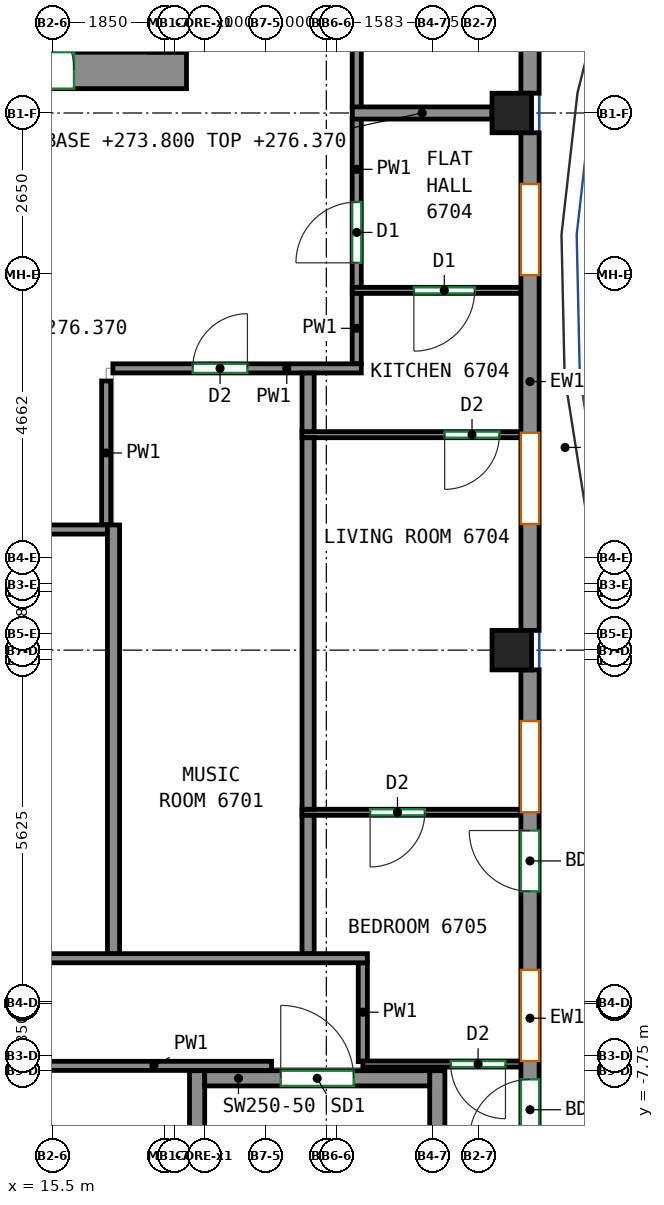
"""IFC4 building model, lengths in metres.
Left out: names, types, materials, properties, quantities, classifications, styles, units other than length and angle.
Written with IfcOpenShell. Run it as: python <this file> out.ifc"""

import sys

from ifc_helpers import new_model, si_unit, direction, frame, frame_2d, origin, origin_2d, place, context, subcontext, project, spatial, rectangle, extrude, source, transform, mapped, element, fill, save


model = new_model("IFC4")
c1 = context("Model", 3, precision=1e-05, world=origin(), true_north=direction((0.0, 1.0)))
c2 = subcontext(c1, "Body", "Model", "MODEL_VIEW")
j1 = project(units=[si_unit("LENGTHUNIT", "METRE"), si_unit("PLANEANGLEUNIT", "RADIAN")], contexts=[c1])
p1 = place(None, origin())
s1 = spatial("IfcSite", under=j1, at=p1, CompositionType="ELEMENT")
p2 = place(p1, origin())
s2 = spatial("IfcBuilding", under=s1, at=p2, CompositionType="ELEMENT")
p3 = place(p2, frame((0.0, 0.0, 273.8)))
s3 = spatial("IfcBuildingStorey", under=s2, at=p3, CompositionType="ELEMENT", Elevation=273.8)
m1 = source(origin(), c2, "Body", "SweptSolid", [
    extrude(rectangle(XDim=0.65, YDim=0.65, at=origin_2d()), origin(), (0.0, 0.0, 1.0), 3.12),
])
for number, where, z_axis, x_axis in (
    (1, (23.05, -0.833, 0.0), (0.0, 0.0, 1.0), (1.0, 0.0, 0.0)),
    (2, (23.05, 8.0, 0.0), (0.0, 0.0, 1.0), (1.0, 0.0, 0.0)),
):
    element("IfcColumn", number, at=place(p3, frame(where, z_axis=z_axis, x_axis=x_axis)), inside=s3, PredefinedType="COLUMN", context=c2, shape_type="MappedRepresentation", body=[
        mapped(m1, transform((0.0, 0.0, 0.0))),
    ])
m2 = source(origin(), c2, "Body", "SweptSolid", [
    extrude(rectangle(XDim=5.23, YDim=0.6, at=frame_2d((2.615, 0.0))), origin(), (0.0, 0.0, 1.0), 3.12),
])
p4 = place(p3, frame((12.47, 8.7, 0.0), z_axis=(0.0, 0.0, 1.0), x_axis=(1.0, 0.0, 0.0)))
e3 = element("IfcWall", 3, at=p4, inside=s3, PredefinedType="SHEAR", context=c2, shape_type="MappedRepresentation", body=[
    mapped(m2, transform((0.0, 0.0, 0.0))),
])
p5 = place(p4, frame((2.18, 0.0, 0.0)))
e4 = element("IfcOpeningElement", 4, at=p5, cuts=e3, PredefinedType="OPENING", context=c2, shape_type="SweptSolid", body=[
    extrude(rectangle(XDim=1.2, YDim=2.1, at=frame_2d((0.6, 1.05))), frame((0.0, 0.31, 0.0), z_axis=(0.0, -1.0, 0.0), x_axis=(1.0, 0.0, 0.0)), (0.0, 0.0, 1.0), 0.62),
])
m3 = source(origin(), c2, "Body", "SweptSolid", [
    extrude(rectangle(XDim=8.0, YDim=0.25, at=frame_2d((4.0, 0.0))), origin(), (0.0, 0.0, 1.0), 3.12),
])
for number, where, z_axis, x_axis in (
    (5, (17.875, -15.75, 0.0), (0.0, 0.0, 1.0), (0.0, 1.0, 0.0)),
    (6, (21.825, -15.75, 0.0), (0.0, 0.0, 1.0), (0.0, 1.0, 0.0)),
):
    element("IfcWall", number, at=place(p3, frame(where, z_axis=z_axis, x_axis=x_axis)), inside=s3, PredefinedType="SHEAR", context=c2, shape_type="MappedRepresentation", body=[
        mapped(m3, transform((0.0, 0.0, 0.0))),
    ])
m4 = source(origin(), c2, "Body", "SweptSolid", [
    extrude(rectangle(XDim=3.7, YDim=0.25, at=frame_2d((1.85, 0.0))), origin(), (0.0, 0.0, 1.0), 3.12),
])
p6 = place(p3, frame((18.0, -7.875, 0.0), z_axis=(0.0, 0.0, 1.0), x_axis=(1.0, 0.0, 0.0)))
e7 = element("IfcWall", 7, at=p6, inside=s3, PredefinedType="SHEAR", context=c2, shape_type="MappedRepresentation", body=[
    mapped(m4, transform((0.0, 0.0, 0.0))),
])
p7 = place(p6, frame((1.25, 0.0, 0.0)))
e8 = element("IfcOpeningElement", 8, at=p7, cuts=e7, PredefinedType="OPENING", context=c2, shape_type="SweptSolid", body=[
    extrude(rectangle(XDim=1.2, YDim=2.1, at=frame_2d((0.6, 1.05))), frame((0.0, 0.135, 0.0), z_axis=(0.0, -1.0, 0.0), x_axis=(1.0, 0.0, 0.0)), (0.0, 0.0, 1.0), 0.27),
])
m5 = source(origin(), c2, "Body", "SweptSolid", [
    extrude(rectangle(XDim=8.184, YDim=0.3, at=frame_2d((4.092, 0.0))), origin(), (0.0, 0.0, 1.0), 3.12),
])
p8 = place(p3, frame((23.35, -9.342, 0.0), z_axis=(0.0, 0.0, 1.0), x_axis=(0.0, 1.0, 0.0)))
e9 = element("IfcWall", 9, at=p8, inside=s3, PredefinedType="SOLIDWALL", context=c2, shape_type="MappedRepresentation", body=[
    mapped(m5, transform((0.0, 0.0, 0.0))),
])
p9 = place(p8, frame((1.75, 0.0, 0.8)))
e10 = element("IfcOpeningElement", 10, at=p9, cuts=e9, PredefinedType="OPENING", context=c2, shape_type="SweptSolid", body=[
    extrude(rectangle(XDim=1.5, YDim=2.05, at=frame_2d((0.75, 1.025))), frame((0.0, 0.16, 0.0), z_axis=(0.0, -1.0, 0.0), x_axis=(1.0, 0.0, 0.0)), (0.0, 0.0, 1.0), 0.32),
])
p10 = place(p8, frame((0.45, 0.0, 0.0)))
e11 = element("IfcOpeningElement", 11, at=p10, cuts=e9, PredefinedType="OPENING", context=c2, shape_type="SweptSolid", body=[
    extrude(rectangle(XDim=1.0, YDim=2.1, at=frame_2d((0.5, 1.05))), frame((0.0, 0.16, 0.0), z_axis=(0.0, -1.0, 0.0), x_axis=(1.0, 0.0, 0.0)), (0.0, 0.0, 1.0), 0.32),
])
p11 = place(p8, frame((5.842, 0.0, 0.8)))
e12 = element("IfcOpeningElement", 12, at=p11, cuts=e9, PredefinedType="OPENING", context=c2, shape_type="SweptSolid", body=[
    extrude(rectangle(XDim=1.5, YDim=2.05, at=frame_2d((0.75, 1.025))), frame((0.0, 0.16, 0.0), z_axis=(0.0, -1.0, 0.0), x_axis=(1.0, 0.0, 0.0)), (0.0, 0.0, 1.0), 0.32),
])
p12 = place(p8, frame((4.542, 0.0, 0.0)))
e13 = element("IfcOpeningElement", 13, at=p12, cuts=e9, PredefinedType="OPENING", context=c2, shape_type="SweptSolid", body=[
    extrude(rectangle(XDim=1.0, YDim=2.1, at=frame_2d((0.5, 1.05))), frame((0.0, 0.16, 0.0), z_axis=(0.0, -1.0, 0.0), x_axis=(1.0, 0.0, 0.0)), (0.0, 0.0, 1.0), 0.32),
])
m6 = source(origin(), c2, "Body", "SweptSolid", [
    extrude(rectangle(XDim=8.183, YDim=0.3, at=frame_2d((4.092, 0.0))), origin(), (0.0, 0.0, 1.0), 3.12),
])
p13 = place(p3, frame((23.35, -0.508, 0.0), z_axis=(0.0, 0.0, 1.0), x_axis=(0.0, 1.0, 0.0)))
e14 = element("IfcWall", 14, at=p13, inside=s3, PredefinedType="SOLIDWALL", context=c2, shape_type="MappedRepresentation", body=[
    mapped(m6, transform((0.0, 0.0, 0.0))),
])
p14 = place(p13, frame((1.75, 0.0, 0.8)))
e15 = element("IfcOpeningElement", 15, at=p14, cuts=e14, PredefinedType="OPENING", context=c2, shape_type="SweptSolid", body=[
    extrude(rectangle(XDim=1.5, YDim=2.05, at=frame_2d((0.75, 1.025))), frame((0.0, 0.16, 0.0), z_axis=(0.0, -1.0, 0.0), x_axis=(1.0, 0.0, 0.0)), (0.0, 0.0, 1.0), 0.32),
])
p15 = place(p13, frame((5.842, 0.0, 0.8)))
e16 = element("IfcOpeningElement", 16, at=p15, cuts=e14, PredefinedType="OPENING", context=c2, shape_type="SweptSolid", body=[
    extrude(rectangle(XDim=1.5, YDim=2.05, at=frame_2d((0.75, 1.025))), frame((0.0, 0.16, 0.0), z_axis=(0.0, -1.0, 0.0), x_axis=(1.0, 0.0, 0.0)), (0.0, 0.0, 1.0), 0.32),
])
m7 = source(origin(), c2, "Body", "SweptSolid", [
    extrude(rectangle(XDim=13.35, YDim=0.3, at=frame_2d((6.675, 0.0))), origin(), (0.0, 0.0, 1.0), 3.12),
])
p16 = place(p3, frame((23.35, 8.325, 0.0), z_axis=(0.0, 0.0, 1.0), x_axis=(0.0, 1.0, 0.0)))
e17 = element("IfcWall", 17, at=p16, inside=s3, PredefinedType="SOLIDWALL", context=c2, shape_type="MappedRepresentation", body=[
    mapped(m7, transform((0.0, 0.0, 0.0))),
])
p17 = place(p16, frame((0.919, 0.0, 0.8)))
e18 = element("IfcOpeningElement", 18, at=p17, cuts=e17, PredefinedType="OPENING", context=c2, shape_type="SweptSolid", body=[
    extrude(rectangle(XDim=1.5, YDim=2.05, at=frame_2d((0.75, 1.025))), frame((0.0, 0.16, 0.0), z_axis=(0.0, -1.0, 0.0), x_axis=(1.0, 0.0, 0.0)), (0.0, 0.0, 1.0), 0.32),
])
p18 = place(p16, frame((4.256, 0.0, 0.8)))
e19 = element("IfcOpeningElement", 19, at=p18, cuts=e17, PredefinedType="OPENING", context=c2, shape_type="SweptSolid", body=[
    extrude(rectangle(XDim=1.5, YDim=2.05, at=frame_2d((0.75, 1.025))), frame((0.0, 0.16, 0.0), z_axis=(0.0, -1.0, 0.0), x_axis=(1.0, 0.0, 0.0)), (0.0, 0.0, 1.0), 0.32),
])
p19 = place(p16, frame((7.594, 0.0, 0.8)))
e20 = element("IfcOpeningElement", 20, at=p19, cuts=e17, PredefinedType="OPENING", context=c2, shape_type="SweptSolid", body=[
    extrude(rectangle(XDim=1.5, YDim=2.05, at=frame_2d((0.75, 1.025))), frame((0.0, 0.16, 0.0), z_axis=(0.0, -1.0, 0.0), x_axis=(1.0, 0.0, 0.0)), (0.0, 0.0, 1.0), 0.32),
])
p20 = place(p16, frame((10.931, 0.0, 0.8)))
e21 = element("IfcOpeningElement", 21, at=p20, cuts=e17, PredefinedType="OPENING", context=c2, shape_type="SweptSolid", body=[
    extrude(rectangle(XDim=1.5, YDim=2.05, at=frame_2d((0.75, 1.025))), frame((0.0, 0.16, 0.0), z_axis=(0.0, -1.0, 0.0), x_axis=(1.0, 0.0, 0.0)), (0.0, 0.0, 1.0), 0.32),
])
p21 = place(p3, frame((15.23, -7.67, 0.0), z_axis=(0.0, 0.0, 1.0), x_axis=(1.0, 0.0, 0.0)))
e22 = element("IfcWall", 22, at=p21, inside=s3, PredefinedType="PARTITIONING", context=c2, shape_type="SweptSolid", body=[
    extrude(rectangle(XDim=3.87, YDim=0.15, at=frame_2d((1.935, 0.0))), origin(), (0.0, 0.0, 1.0), 3.12),
])
p22 = place(p3, frame((20.6, -7.6, 0.0), z_axis=(0.0, 0.0, 1.0), x_axis=(0.0, 1.0, 0.0)))
e23 = element("IfcWall", 23, at=p22, inside=s3, PredefinedType="PARTITIONING", context=c2, shape_type="SweptSolid", body=[
    extrude(rectangle(XDim=1.625, YDim=0.15, at=frame_2d((0.812, 0.0))), origin(), (0.0, 0.0, 1.0), 3.12),
])
p23 = place(p3, frame((20.5, 3.875, 0.0), z_axis=(0.0, 0.0, 1.0), x_axis=(0.0, 1.0, 0.0)))
e24 = element("IfcWall", 24, at=p23, inside=s3, PredefinedType="PARTITIONING", context=c2, shape_type="SweptSolid", body=[
    extrude(rectangle(XDim=1.168, YDim=0.15, at=frame_2d((0.584, 0.0))), origin(), (0.0, 0.0, 1.0), 3.12),
])
p24 = place(p3, frame((20.5, 5.123, 0.0), z_axis=(0.0, 0.0, 1.0), x_axis=(0.0, 1.0, 0.0)))
e25 = element("IfcWall", 25, at=p24, inside=s3, PredefinedType="PARTITIONING", context=c2, shape_type="SweptSolid", body=[
    extrude(rectangle(XDim=2.787, YDim=0.15, at=frame_2d((1.394, 0.0))), origin(), (0.0, 0.0, 1.0), 3.12),
])
p25 = place(p24, frame((0.413, 0.0, 0.0)))
e26 = element("IfcOpeningElement", 26, at=p25, cuts=e25, PredefinedType="OPENING", context=c2, shape_type="SweptSolid", body=[
    extrude(rectangle(XDim=1.0, YDim=2.1, at=frame_2d((0.5, 1.05))), frame((0.0, 0.085, 0.0), z_axis=(0.0, -1.0, 0.0), x_axis=(1.0, 0.0, 0.0)), (0.0, 0.0, 1.0), 0.17),
])
p26 = place(p3, frame((20.5, 8.09, 0.0), z_axis=(0.0, 0.0, 1.0), x_axis=(0.0, 1.0, 0.0)))
e27 = element("IfcWall", 27, at=p26, inside=s3, PredefinedType="PARTITIONING", context=c2, shape_type="SweptSolid", body=[
    extrude(rectangle(XDim=15.01, YDim=0.15, at=frame_2d((7.505, 0.0))), origin(), (0.0, 0.0, 1.0), 3.12),
])
p27 = place(p26, frame((7.505, 0.0, 0.0)))
e28 = element("IfcOpeningElement", 28, at=p27, cuts=e27, PredefinedType="OPENING", context=c2, shape_type="SweptSolid", body=[
    extrude(rectangle(XDim=0.9, YDim=2.1, at=frame_2d((0.45, 1.05))), frame((0.0, 0.085, 0.0), z_axis=(0.0, -1.0, 0.0), x_axis=(1.0, 0.0, 0.0)), (0.0, 0.0, 1.0), 0.17),
])
p28 = place(p3, frame((16.38, 1.225, 0.0), z_axis=(0.0, 0.0, 1.0), x_axis=(0.0, 1.0, 0.0)))
e29 = element("IfcWall", 29, at=p28, inside=s3, PredefinedType="PARTITIONING", context=c2, shape_type="SweptSolid", body=[
    extrude(rectangle(XDim=2.368, YDim=0.15, at=frame_2d((1.184, 0.0))), origin(), (0.0, 0.0, 1.0), 3.12),
])
p29 = place(p3, frame((8.305, 1.15, 0.0), z_axis=(0.0, 0.0, 1.0), x_axis=(1.0, 0.0, 0.0)))
e30 = element("IfcWall", 30, at=p29, inside=s3, PredefinedType="PARTITIONING", context=c2, shape_type="SweptSolid", body=[
    extrude(rectangle(XDim=8.095, YDim=0.15, at=frame_2d((4.047, 0.0))), origin(), (0.0, 0.0, 1.0), 3.12),
])
p30 = place(p3, frame((8.305, -5.9, 0.0), z_axis=(0.0, 0.0, 1.0), x_axis=(1.0, 0.0, 0.0)))
e31 = element("IfcWall", 31, at=p30, inside=s3, PredefinedType="PARTITIONING", context=c2, shape_type="SweptSolid", body=[
    extrude(rectangle(XDim=12.37, YDim=0.15, at=frame_2d((6.185, 0.0))), origin(), (0.0, 0.0, 1.0), 3.12),
])
p31 = place(p30, frame((6.004, 0.0, 0.0)))
e32 = element("IfcOpeningElement", 32, at=p31, cuts=e31, PredefinedType="OPENING", context=c2, shape_type="SweptSolid", body=[
    extrude(rectangle(XDim=0.9, YDim=2.1, at=frame_2d((0.45, 1.05))), frame((0.0, 0.085, 0.0), z_axis=(0.0, -1.0, 0.0), x_axis=(1.0, 0.0, 0.0)), (0.0, 0.0, 1.0), 0.17),
])
p32 = place(p3, frame((16.49, 3.8, 0.0), z_axis=(0.0, 0.0, 1.0), x_axis=(1.0, 0.0, 0.0)))
e33 = element("IfcWall", 33, at=p32, inside=s3, PredefinedType="PARTITIONING", context=c2, shape_type="SweptSolid", body=[
    extrude(rectangle(XDim=4.085, YDim=0.15, at=frame_2d((2.042, 0.0))), origin(), (0.0, 0.0, 1.0), 3.12),
])
p33 = place(p32, frame((1.312, 0.0, 0.0)))
e34 = element("IfcOpeningElement", 34, at=p33, cuts=e33, PredefinedType="OPENING", context=c2, shape_type="SweptSolid", body=[
    extrude(rectangle(XDim=0.9, YDim=2.1, at=frame_2d((0.45, 1.05))), frame((0.0, 0.085, 0.0), z_axis=(0.0, -1.0, 0.0), x_axis=(1.0, 0.0, 0.0)), (0.0, 0.0, 1.0), 0.17),
])
p34 = place(p3, frame((23.25, -7.64, 0.0), z_axis=(0.0, 0.0, 1.0), x_axis=(-1.0, 0.0, 0.0)))
e35 = element("IfcWall", 35, at=p34, inside=s3, PredefinedType="PARTITIONING", context=c2, shape_type="SweptSolid", body=[
    extrude(rectangle(XDim=2.65, YDim=0.1, at=frame_2d((1.325, 0.0))), origin(), (0.0, 0.0, 1.0), 3.12),
])
p35 = place(p34, frame((0.304, 0.0, 0.0)))
e36 = element("IfcOpeningElement", 36, at=p35, cuts=e35, PredefinedType="OPENING", context=c2, shape_type="SweptSolid", body=[
    extrude(rectangle(XDim=0.9, YDim=2.1, at=frame_2d((0.45, 1.05))), frame((0.0, 0.06, 0.0), z_axis=(0.0, -1.0, 0.0), x_axis=(1.0, 0.0, 0.0)), (0.0, 0.0, 1.0), 0.12),
])
p36 = place(p3, frame((23.25, -3.5, 0.0), z_axis=(0.0, 0.0, 1.0), x_axis=(-1.0, 0.0, 0.0)))
e37 = element("IfcWall", 37, at=p36, inside=s3, PredefinedType="PARTITIONING", context=c2, shape_type="SweptSolid", body=[
    extrude(rectangle(XDim=3.65, YDim=0.1, at=frame_2d((1.825, 0.0))), origin(), (0.0, 0.0, 1.0), 3.12),
])
p37 = place(p36, frame((1.63, 0.0, 0.0)))
e38 = element("IfcOpeningElement", 38, at=p37, cuts=e37, PredefinedType="OPENING", context=c2, shape_type="SweptSolid", body=[
    extrude(rectangle(XDim=0.9, YDim=2.1, at=frame_2d((0.45, 1.05))), frame((0.0, 0.06, 0.0), z_axis=(0.0, -1.0, 0.0), x_axis=(1.0, 0.0, 0.0)), (0.0, 0.0, 1.0), 0.12),
])
p38 = place(p3, frame((19.7, -5.823, 0.0), z_axis=(0.0, 0.0, 1.0), x_axis=(0.0, 1.0, 0.0)))
e39 = element("IfcWall", 39, at=p38, inside=s3, PredefinedType="PARTITIONING", context=c2, shape_type="SweptSolid", body=[
    extrude(rectangle(XDim=2.273, YDim=0.2, at=frame_2d((1.136, 0.0))), origin(), (0.0, 0.0, 1.0), 3.12),
])
p39 = place(p3, frame((23.25, 2.71, 0.0), z_axis=(0.0, 0.0, 1.0), x_axis=(-1.0, 0.0, 0.0)))
e40 = element("IfcWall", 40, at=p39, inside=s3, PredefinedType="PARTITIONING", context=c2, shape_type="SweptSolid", body=[
    extrude(rectangle(XDim=3.65, YDim=0.1, at=frame_2d((1.825, 0.0))), origin(), (0.0, 0.0, 1.0), 3.12),
])
p40 = place(p39, frame((0.404, 0.0, 0.0)))
e41 = element("IfcOpeningElement", 41, at=p40, cuts=e40, PredefinedType="OPENING", context=c2, shape_type="SweptSolid", body=[
    extrude(rectangle(XDim=0.9, YDim=2.1, at=frame_2d((0.45, 1.05))), frame((0.0, 0.06, 0.0), z_axis=(0.0, -1.0, 0.0), x_axis=(1.0, 0.0, 0.0)), (0.0, 0.0, 1.0), 0.12),
])
p41 = place(p3, frame((19.7, -3.45, 0.0), z_axis=(0.0, 0.0, 1.0), x_axis=(0.0, 1.0, 0.0)))
e42 = element("IfcWall", 42, at=p41, inside=s3, PredefinedType="PARTITIONING", context=c2, shape_type="SweptSolid", body=[
    extrude(rectangle(XDim=6.11, YDim=0.2, at=frame_2d((3.055, 0.0))), origin(), (0.0, 0.0, 1.0), 3.12),
])
p42 = place(p3, frame((23.25, 5.083, 0.0), z_axis=(0.0, 0.0, 1.0), x_axis=(-1.0, 0.0, 0.0)))
e43 = element("IfcWall", 43, at=p42, inside=s3, PredefinedType="PARTITIONING", context=c2, shape_type="SweptSolid", body=[
    extrude(rectangle(XDim=2.823, YDim=0.1, at=frame_2d((1.412, 0.0))), origin(), (0.0, 0.0, 1.0), 3.12),
])
p43 = place(p42, frame((0.81, 0.0, 0.0)))
e44 = element("IfcOpeningElement", 44, at=p43, cuts=e43, PredefinedType="OPENING", context=c2, shape_type="SweptSolid", body=[
    extrude(rectangle(XDim=1.0, YDim=2.1, at=frame_2d((0.5, 1.05))), frame((0.0, 0.06, 0.0), z_axis=(0.0, -1.0, 0.0), x_axis=(1.0, 0.0, 0.0)), (0.0, 0.0, 1.0), 0.12),
])
p44 = place(p3, frame((19.7, 2.76, 0.0), z_axis=(0.0, 0.0, 1.0), x_axis=(0.0, 1.0, 0.0)))
e45 = element("IfcWall", 45, at=p44, inside=s3, PredefinedType="PARTITIONING", context=c2, shape_type="SweptSolid", body=[
    extrude(rectangle(XDim=0.963, YDim=0.2, at=frame_2d((0.481, 0.0))), origin(), (0.0, 0.0, 1.0), 3.12),
])
p45 = place(p3, frame((20.427, 8.0, 0.0), z_axis=(0.0, 0.0, 1.0), x_axis=(1.0, 0.0, 0.0)))
e46 = element("IfcWall", 46, at=p45, inside=s3, PredefinedType="PARTITIONING", context=c2, shape_type="SweptSolid", body=[
    extrude(rectangle(XDim=2.298, YDim=0.2, at=frame_2d((1.149, 0.0))), origin(), (0.0, 0.0, 1.0), 2.57),
])
p46 = place(p3, frame((16.5, -5.823, 0.0), z_axis=(0.0, 0.0, 1.0), x_axis=(0.0, 1.0, 0.0)))
e47 = element("IfcWall", 47, at=p46, inside=s3, PredefinedType="PARTITIONING", context=c2, shape_type="SweptSolid", body=[
    extrude(rectangle(XDim=7.048, YDim=0.2, at=frame_2d((3.524, 0.0))), origin(), (0.0, 0.0, 1.0), 3.12),
])
p47 = place(p9, origin())
e48 = element("IfcWindow", 48, at=p47, inside=s3, PartitioningType="SINGLE_PANEL", PredefinedType="WINDOW", context=c2, shape_type="SweptSolid", body=[
    extrude(rectangle(XDim=1.5, YDim=2.05, at=frame_2d((0.75, 1.025))), frame((0.0, 0.03, 0.0), z_axis=(0.0, -1.0, 0.0), x_axis=(1.0, 0.0, 0.0)), (0.0, 0.0, 1.0), 0.06),
])
fill(e10, e48)
p48 = place(p10, origin())
e49 = element("IfcDoor", 49, at=p48, inside=s3, OperationType="SINGLE_SWING_LEFT", PredefinedType="DOOR", context=c2, shape_type="SweptSolid", body=[
    extrude(rectangle(XDim=1.0, YDim=2.1, at=frame_2d((0.5, 1.05))), frame((0.0, 0.025, 0.0), z_axis=(0.0, -1.0, 0.0), x_axis=(1.0, 0.0, 0.0)), (0.0, 0.0, 1.0), 0.05),
])
fill(e11, e49)
p49 = place(p11, origin())
e50 = element("IfcWindow", 50, at=p49, inside=s3, PartitioningType="SINGLE_PANEL", PredefinedType="WINDOW", context=c2, shape_type="SweptSolid", body=[
    extrude(rectangle(XDim=1.5, YDim=2.05, at=frame_2d((0.75, 1.025))), frame((0.0, 0.03, 0.0), z_axis=(0.0, -1.0, 0.0), x_axis=(1.0, 0.0, 0.0)), (0.0, 0.0, 1.0), 0.06),
])
fill(e12, e50)
p50 = place(p12, origin())
e51 = element("IfcDoor", 51, at=p50, inside=s3, OperationType="SINGLE_SWING_RIGHT", PredefinedType="DOOR", context=c2, shape_type="SweptSolid", body=[
    extrude(rectangle(XDim=1.0, YDim=2.1, at=frame_2d((0.5, 1.05))), frame((0.0, 0.025, 0.0), z_axis=(0.0, -1.0, 0.0), x_axis=(1.0, 0.0, 0.0)), (0.0, 0.0, 1.0), 0.05),
])
fill(e13, e51)
p51 = place(p14, origin())
e52 = element("IfcWindow", 52, at=p51, inside=s3, PartitioningType="SINGLE_PANEL", PredefinedType="WINDOW", context=c2, shape_type="SweptSolid", body=[
    extrude(rectangle(XDim=1.5, YDim=2.05, at=frame_2d((0.75, 1.025))), frame((0.0, 0.03, 0.0), z_axis=(0.0, -1.0, 0.0), x_axis=(1.0, 0.0, 0.0)), (0.0, 0.0, 1.0), 0.06),
])
fill(e15, e52)
p52 = place(p15, origin())
e53 = element("IfcWindow", 53, at=p52, inside=s3, PartitioningType="SINGLE_PANEL", PredefinedType="WINDOW", context=c2, shape_type="SweptSolid", body=[
    extrude(rectangle(XDim=1.5, YDim=2.05, at=frame_2d((0.75, 1.025))), frame((0.0, 0.03, 0.0), z_axis=(0.0, -1.0, 0.0), x_axis=(1.0, 0.0, 0.0)), (0.0, 0.0, 1.0), 0.06),
])
fill(e16, e53)
p53 = place(p5, origin())
e54 = element("IfcDoor", 54, at=p53, inside=s3, OperationType="DOUBLE_DOOR_SINGLE_SWING", PredefinedType="DOOR", context=c2, shape_type="SweptSolid", body=[
    extrude(rectangle(XDim=1.2, YDim=2.1, at=frame_2d((0.6, 1.05))), frame((0.0, 0.205, 0.0), z_axis=(0.0, -1.0, 0.0), x_axis=(1.0, 0.0, 0.0)), (0.0, 0.0, 1.0), 0.05),
])
fill(e4, e54)
p54 = place(p7, origin())
e55 = element("IfcDoor", 55, at=p54, inside=s3, OperationType="DOUBLE_DOOR_SINGLE_SWING", PredefinedType="DOOR", context=c2, shape_type="SweptSolid", body=[
    extrude(rectangle(XDim=1.2, YDim=2.1, at=frame_2d((0.6, 1.05))), frame((0.0, 0.025, 0.0), z_axis=(0.0, -1.0, 0.0), x_axis=(1.0, 0.0, 0.0)), (0.0, 0.0, 1.0), 0.05),
])
fill(e8, e55)
p55 = place(p35, origin())
e56 = element("IfcDoor", 56, at=p55, inside=s3, OperationType="SINGLE_SWING_LEFT", PredefinedType="DOOR", context=c2, shape_type="SweptSolid", body=[
    extrude(rectangle(XDim=0.9, YDim=2.1, at=frame_2d((0.45, 1.05))), frame((0.0, 0.025, 0.0), z_axis=(0.0, -1.0, 0.0), x_axis=(1.0, 0.0, 0.0)), (0.0, 0.0, 1.0), 0.05),
])
fill(e36, e56)
p56 = place(p37, origin())
e57 = element("IfcDoor", 57, at=p56, inside=s3, OperationType="SINGLE_SWING_RIGHT", PredefinedType="DOOR", context=c2, shape_type="SweptSolid", body=[
    extrude(rectangle(XDim=0.9, YDim=2.1, at=frame_2d((0.45, 1.05))), frame((0.0, 0.025, 0.0), z_axis=(0.0, -1.0, 0.0), x_axis=(1.0, 0.0, 0.0)), (0.0, 0.0, 1.0), 0.05),
])
fill(e38, e57)
p57 = place(p40, origin())
e58 = element("IfcDoor", 58, at=p57, inside=s3, OperationType="SINGLE_SWING_RIGHT", PredefinedType="DOOR", context=c2, shape_type="SweptSolid", body=[
    extrude(rectangle(XDim=0.9, YDim=2.1, at=frame_2d((0.45, 1.05))), frame((0.0, 0.025, 0.0), z_axis=(0.0, -1.0, 0.0), x_axis=(1.0, 0.0, 0.0)), (0.0, 0.0, 1.0), 0.05),
])
fill(e41, e58)
p58 = place(p33, origin())
e59 = element("IfcDoor", 59, at=p58, inside=s3, OperationType="SINGLE_SWING_RIGHT", PredefinedType="DOOR", context=c2, shape_type="SweptSolid", body=[
    extrude(rectangle(XDim=0.9, YDim=2.1, at=frame_2d((0.45, 1.05))), frame((0.0, 0.025, 0.0), z_axis=(0.0, -1.0, 0.0), x_axis=(1.0, 0.0, 0.0)), (0.0, 0.0, 1.0), 0.05),
])
fill(e34, e59)
p59 = place(p43, origin())
e60 = element("IfcDoor", 60, at=p59, inside=s3, OperationType="SINGLE_SWING_RIGHT", PredefinedType="DOOR", context=c2, shape_type="SweptSolid", body=[
    extrude(rectangle(XDim=1.0, YDim=2.1, at=frame_2d((0.5, 1.05))), frame((0.0, 0.025, 0.0), z_axis=(0.0, -1.0, 0.0), x_axis=(1.0, 0.0, 0.0)), (0.0, 0.0, 1.0), 0.05),
])
fill(e44, e60)
p60 = place(p25, origin())
e61 = element("IfcDoor", 61, at=p60, inside=s3, OperationType="SINGLE_SWING_LEFT", PredefinedType="DOOR", context=c2, shape_type="SweptSolid", body=[
    extrude(rectangle(XDim=1.0, YDim=2.1, at=frame_2d((0.5, 1.05))), frame((0.0, 0.025, 0.0), z_axis=(0.0, -1.0, 0.0), x_axis=(1.0, 0.0, 0.0)), (0.0, 0.0, 1.0), 0.05),
])
fill(e26, e61)
save(model, sys.argv[1])
